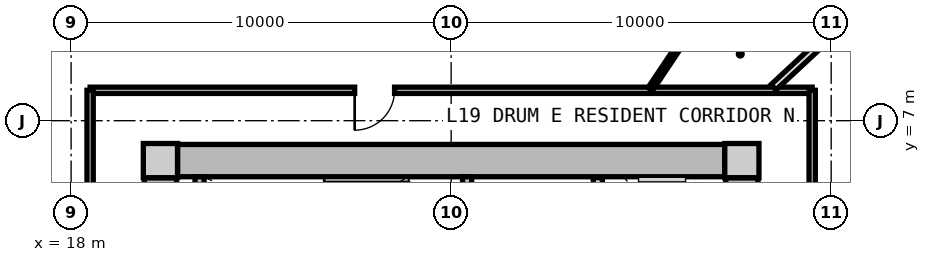
"""IFC4 building model, lengths in metres.
Left out: names, types, materials, properties, quantities, classifications, styles, units other than length and angle.
Written with IfcOpenShell. Run it as: python <this file> out.ifc"""

import sys

from ifc_helpers import new_model, si_unit, direction, frame, frame_2d, origin, origin_2d, place, context, subcontext, project, spatial, rectangle, extrude, source, transform, mapped, element, fill, save


model = new_model("IFC4")
c1 = context("Model", 3, precision=1e-05, world=origin(), true_north=direction((0.0, 1.0)))
c2 = subcontext(c1, "Body", "Model", "MODEL_VIEW")
j1 = project(units=[si_unit("LENGTHUNIT", "METRE"), si_unit("PLANEANGLEUNIT", "RADIAN")], contexts=[c1])
p1 = place(None, origin())
s1 = spatial("IfcSite", under=j1, at=p1, CompositionType="ELEMENT")
p2 = place(p1, origin())
s2 = spatial("IfcBuilding", under=s1, at=p2, CompositionType="ELEMENT")
p3 = place(p2, frame((0.0, 0.0, 64.3)))
s3 = spatial("IfcBuildingStorey", under=s2, at=p3, CompositionType="ELEMENT", Elevation=64.3)
m1 = source(origin(), c2, "Body", "SweptSolid", [
    extrude(rectangle(XDim=0.9, YDim=0.9, at=origin_2d()), origin(), (0.0, 0.0, 1.0), 3.05),
])
for number, where, z_axis, x_axis in (
    (1, (35.65, 5.95, 0.0), (0.0, 0.0, 1.0), (1.0, 0.0, 0.0)),
    (2, (20.35, 5.95, 0.0), (0.0, 0.0, 1.0), (1.0, 0.0, 0.0)),
):
    element("IfcColumn", number, at=place(p3, frame(where, z_axis=z_axis, x_axis=x_axis)), inside=s3, PredefinedType="COLUMN", context=c2, shape_type="MappedRepresentation", body=[
        mapped(m1, transform((0.0, 0.0, 0.0), x_axis=(1.0, 0.0, 0.0), y_axis=(0.0, 1.0, 0.0), z_axis=(0.0, 0.0, 1.0), scale=1.0)),
    ])
m2 = source(origin(), c2, "Body", "SweptSolid", [
    extrude(rectangle(XDim=14.4, YDim=0.85, at=frame_2d((7.2, 0.0))), origin(), (0.0, 0.0, 1.0), 2.79),
])
p4 = place(p3, frame((20.8, 5.95, 0.0), z_axis=(0.0, 0.0, 1.0), x_axis=(1.0, 0.0, 0.0)))
e3 = element("IfcWall", 3, at=p4, inside=s3, PredefinedType="SHEAR", context=c2, shape_type="MappedRepresentation", body=[
    mapped(m2, transform((0.0, 0.0, 0.0), x_axis=(1.0, 0.0, 0.0), y_axis=(0.0, 1.0, 0.0), z_axis=(0.0, 0.0, 1.0), scale=1.0)),
])
m3 = source(origin(), c2, "Body", "SweptSolid", [
    extrude(rectangle(XDim=11.0, YDim=0.85, at=frame_2d((5.5, 0.0))), origin(), (0.0, 0.0, 1.0), 2.79),
])
p5 = place(p3, frame((20.35, -5.5, 0.0), z_axis=(0.0, 0.0, 1.0), x_axis=(0.0, 1.0, 0.0)))
e4 = element("IfcWall", 4, at=p5, inside=s3, PredefinedType="SHEAR", context=c2, shape_type="MappedRepresentation", body=[
    mapped(m3, transform((0.0, 0.0, 0.0), x_axis=(1.0, 0.0, 0.0), y_axis=(0.0, 1.0, 0.0), z_axis=(0.0, 0.0, 1.0), scale=1.0)),
])
p6 = place(p5, frame((3.8, 0.0, 0.0)))
e5 = element("IfcOpeningElement", 5, at=p6, cuts=e4, PredefinedType="OPENING", context=c2, shape_type="SweptSolid", body=[
    extrude(rectangle(XDim=1.2, YDim=2.15, at=frame_2d((0.6, 1.075))), frame((0.0, 0.435, 0.0), z_axis=(0.0, -1.0, 0.0), x_axis=(1.0, 0.0, 0.0)), (0.0, 0.0, 1.0), 0.87),
])
p7 = place(p3, frame((35.65, 5.5, 0.0), z_axis=(0.0, 0.0, 1.0), x_axis=(0.0, -1.0, 0.0)))
e6 = element("IfcWall", 6, at=p7, inside=s3, PredefinedType="SHEAR", context=c2, shape_type="MappedRepresentation", body=[
    mapped(m3, transform((0.0, 0.0, 0.0), x_axis=(1.0, 0.0, 0.0), y_axis=(0.0, 1.0, 0.0), z_axis=(0.0, 0.0, 1.0), scale=1.0)),
])
p8 = place(p7, frame((5.65, 0.0, 0.0)))
e7 = element("IfcOpeningElement", 7, at=p8, cuts=e6, PredefinedType="OPENING", context=c2, shape_type="SweptSolid", body=[
    extrude(rectangle(XDim=1.2, YDim=2.15, at=frame_2d((0.6, 1.075))), frame((0.0, 0.435, 0.0), z_axis=(0.0, -1.0, 0.0), x_axis=(1.0, 0.0, 0.0)), (0.0, 0.0, 1.0), 0.87),
])
m4 = source(origin(), c2, "Body", "SweptSolid", [
    extrude(rectangle(XDim=3.075, YDim=0.24, at=frame_2d((1.538, 0.0))), origin(), (0.0, 0.0, 1.0), 2.79),
])
p9 = place(p3, frame((21.38, 2.45, 0.0), z_axis=(0.0, 0.0, 1.0), x_axis=(0.0, 1.0, 0.0)))
e8 = element("IfcWall", 8, at=p9, inside=s3, PredefinedType="PARTITIONING", context=c2, shape_type="MappedRepresentation", body=[
    mapped(m4, transform((0.0, 0.0, 0.0), x_axis=(1.0, 0.0, 0.0), y_axis=(0.0, 1.0, 0.0), z_axis=(0.0, 0.0, 1.0), scale=1.0)),
])
p10 = place(p3, frame((28.42, 2.45, 0.0), z_axis=(0.0, 0.0, 1.0), x_axis=(0.0, 1.0, 0.0)))
e9 = element("IfcWall", 9, at=p10, inside=s3, PredefinedType="PARTITIONING", context=c2, shape_type="MappedRepresentation", body=[
    mapped(m4, transform((0.0, 0.0, 0.0), x_axis=(1.0, 0.0, 0.0), y_axis=(0.0, 1.0, 0.0), z_axis=(0.0, 0.0, 1.0), scale=1.0)),
])
p11 = place(p10, frame((0.55, 0.0, 0.0)))
e10 = element("IfcOpeningElement", 10, at=p11, cuts=e9, PredefinedType="OPENING", context=c2, shape_type="SweptSolid", body=[
    extrude(rectangle(XDim=1.1, YDim=2.15, at=frame_2d((0.55, 1.075))), frame((0.0, 0.13, 0.0), z_axis=(0.0, -1.0, 0.0), x_axis=(1.0, 0.0, 0.0)), (0.0, 0.0, 1.0), 0.26),
])
m5 = source(origin(), c2, "Body", "SweptSolid", [
    extrude(rectangle(XDim=5.0, YDim=0.24, at=frame_2d((2.5, 0.0))), origin(), (0.0, 0.0, 1.0), 2.775),
])
p12 = place(p3, frame((31.86, 0.5, 0.0), z_axis=(0.0, 0.0, 1.0), x_axis=(0.0, 1.0, 0.0)))
e11 = element("IfcWall", 11, at=p12, inside=s3, PredefinedType="PARTITIONING", context=c2, shape_type="MappedRepresentation", body=[
    mapped(m5, transform((0.0, 0.0, 0.0), x_axis=(1.0, 0.0, 0.0), y_axis=(0.0, 1.0, 0.0), z_axis=(0.0, 0.0, 1.0), scale=1.0)),
])
p13 = place(p12, frame((3.05, 0.0, 0.0)))
e12 = element("IfcOpeningElement", 12, at=p13, cuts=e11, PredefinedType="OPENING", context=c2, shape_type="SweptSolid", body=[
    extrude(rectangle(XDim=1.3, YDim=2.2, at=frame_2d((0.65, 1.1))), frame((0.0, 0.13, 0.0), z_axis=(0.0, -1.0, 0.0), x_axis=(1.0, 0.0, 0.0)), (0.0, 0.0, 1.0), 0.26),
])
p14 = place(p12, frame((0.55, 0.0, 0.0)))
e13 = element("IfcOpeningElement", 13, at=p14, cuts=e11, PredefinedType="OPENING", context=c2, shape_type="SweptSolid", body=[
    extrude(rectangle(XDim=1.3, YDim=2.2, at=frame_2d((0.65, 1.1))), frame((0.0, 0.13, 0.0), z_axis=(0.0, -1.0, 0.0), x_axis=(1.0, 0.0, 0.0)), (0.0, 0.0, 1.0), 0.26),
])
m6 = source(origin(), c2, "Body", "SweptSolid", [
    extrude(rectangle(XDim=19.0, YDim=0.165, at=frame_2d((9.5, 0.0))), origin(), (0.0, 0.0, 1.0), 2.775),
])
p15 = place(p3, frame((18.5, 7.8, 0.0), z_axis=(0.0, 0.0, 1.0), x_axis=(1.0, 0.0, 0.0)))
e14 = element("IfcWall", 14, at=p15, inside=s3, PredefinedType="PARTITIONING", context=c2, shape_type="MappedRepresentation", body=[
    mapped(m6, transform((0.0, 0.0, 0.0), x_axis=(1.0, 0.0, 0.0), y_axis=(0.0, 1.0, 0.0), z_axis=(0.0, 0.0, 1.0), scale=1.0)),
])
p16 = place(p15, frame((6.961, 0.0, 0.0)))
e15 = element("IfcOpeningElement", 15, at=p16, cuts=e14, PredefinedType="OPENING", context=c2, shape_type="SweptSolid", body=[
    extrude(rectangle(XDim=1.05, YDim=2.15, at=frame_2d((0.525, 1.075))), frame((0.0, 0.093, 0.0), z_axis=(0.0, -1.0, 0.0), x_axis=(1.0, 0.0, 0.0)), (0.0, 0.0, 1.0), 0.185),
])
m7 = source(origin(), c2, "Body", "SweptSolid", [
    extrude(rectangle(XDim=15.6, YDim=0.165, at=frame_2d((7.8, 0.0))), origin(), (0.0, 0.0, 1.0), 2.775),
])
p17 = place(p3, frame((18.5, -7.8, 0.0), z_axis=(0.0, 0.0, 1.0), x_axis=(0.0, 1.0, 0.0)))
e16 = element("IfcWall", 16, at=p17, inside=s3, PredefinedType="PARTITIONING", context=c2, shape_type="MappedRepresentation", body=[
    mapped(m7, transform((0.0, 0.0, 0.0), x_axis=(1.0, 0.0, 0.0), y_axis=(0.0, 1.0, 0.0), z_axis=(0.0, 0.0, 1.0), scale=1.0)),
])
p18 = place(p17, frame((3.63, 0.0, 0.0)))
e17 = element("IfcOpeningElement", 17, at=p18, cuts=e16, PredefinedType="OPENING", context=c2, shape_type="SweptSolid", body=[
    extrude(rectangle(XDim=1.05, YDim=2.15, at=frame_2d((0.525, 1.075))), frame((0.0, 0.093, 0.0), z_axis=(0.0, -1.0, 0.0), x_axis=(1.0, 0.0, 0.0)), (0.0, 0.0, 1.0), 0.185),
])
p19 = place(p3, frame((37.5, 7.8, 0.0), z_axis=(0.0, 0.0, 1.0), x_axis=(0.0, -1.0, 0.0)))
e18 = element("IfcWall", 18, at=p19, inside=s3, PredefinedType="PARTITIONING", context=c2, shape_type="MappedRepresentation", body=[
    mapped(m7, transform((0.0, 0.0, 0.0), x_axis=(1.0, 0.0, 0.0), y_axis=(0.0, 1.0, 0.0), z_axis=(0.0, 0.0, 1.0), scale=1.0)),
])
p20 = place(p19, frame((7.275, 0.0, 0.0)))
e19 = element("IfcOpeningElement", 19, at=p20, cuts=e18, PredefinedType="OPENING", context=c2, shape_type="SweptSolid", body=[
    extrude(rectangle(XDim=1.05, YDim=2.15, at=frame_2d((0.525, 1.075))), frame((0.0, 0.093, 0.0), z_axis=(0.0, -1.0, 0.0), x_axis=(1.0, 0.0, 0.0)), (0.0, 0.0, 1.0), 0.185),
])
m8 = source(origin(), c2, "Body", "SweptSolid", [
    extrude(rectangle(XDim=7.435, YDim=0.19, at=frame_2d((3.717, 0.0))), origin(), (0.0, 0.0, 1.0), 2.225),
])
p21 = place(p3, frame((36.483, 7.88, 0.0), z_axis=(0.0, 0.0, 1.0), x_axis=(0.732651956848, 0.680603489652, 0.0)))
e20 = element("IfcWall", 20, at=p21, inside=s3, PredefinedType="PARTITIONING", context=c2, shape_type="MappedRepresentation", body=[
    mapped(m8, transform((0.0, 0.0, 0.0), x_axis=(1.0, 0.0, 0.0), y_axis=(0.0, 1.0, 0.0), z_axis=(0.0, 0.0, 1.0), scale=1.0)),
])
m9 = source(origin(), c2, "Body", "SweptSolid", [
    extrude(rectangle(XDim=3.025, YDim=0.14, at=frame_2d((1.513, 0.0))), origin(), (0.0, 0.0, 1.0), 2.775),
])
p22 = place(p3, frame((33.24, 7.83, 0.0), z_axis=(0.0, 0.0, 1.0), x_axis=(0.556189165904, 0.831055721195, 0.0)))
e21 = element("IfcWall", 21, at=p22, inside=s3, PredefinedType="PARTITIONING", context=c2, shape_type="MappedRepresentation", body=[
    mapped(m9, transform((0.0, 0.0, 0.0), x_axis=(1.0, 0.0, 0.0), y_axis=(0.0, 1.0, 0.0), z_axis=(0.0, 0.0, 1.0), scale=1.0)),
])
m10 = source(origin(), c2, "Body", "SweptSolid", [
    extrude(rectangle(XDim=1.05, YDim=2.15, at=frame_2d((0.525, 1.075))), frame((0.0, 0.025, 0.0), z_axis=(0.0, -1.0, 0.0), x_axis=(1.0, 0.0, 0.0)), (0.0, 0.0, 1.0), 0.05),
])
p23 = place(p16, frame((1.05, 0.0, 0.0), z_axis=(0.0, 0.0, 1.0), x_axis=(-1.0, 0.0, 0.0)))
e22 = element("IfcDoor", 22, at=p23, inside=s3, OperationType="SINGLE_SWING_RIGHT", PredefinedType="DOOR", context=c2, shape_type="MappedRepresentation", body=[
    mapped(m10, transform((0.0, 0.0, 0.0), x_axis=(1.0, 0.0, 0.0), y_axis=(0.0, 1.0, 0.0), z_axis=(0.0, 0.0, 1.0), scale=1.0)),
])
fill(e15, e22)
save(model, sys.argv[1])
